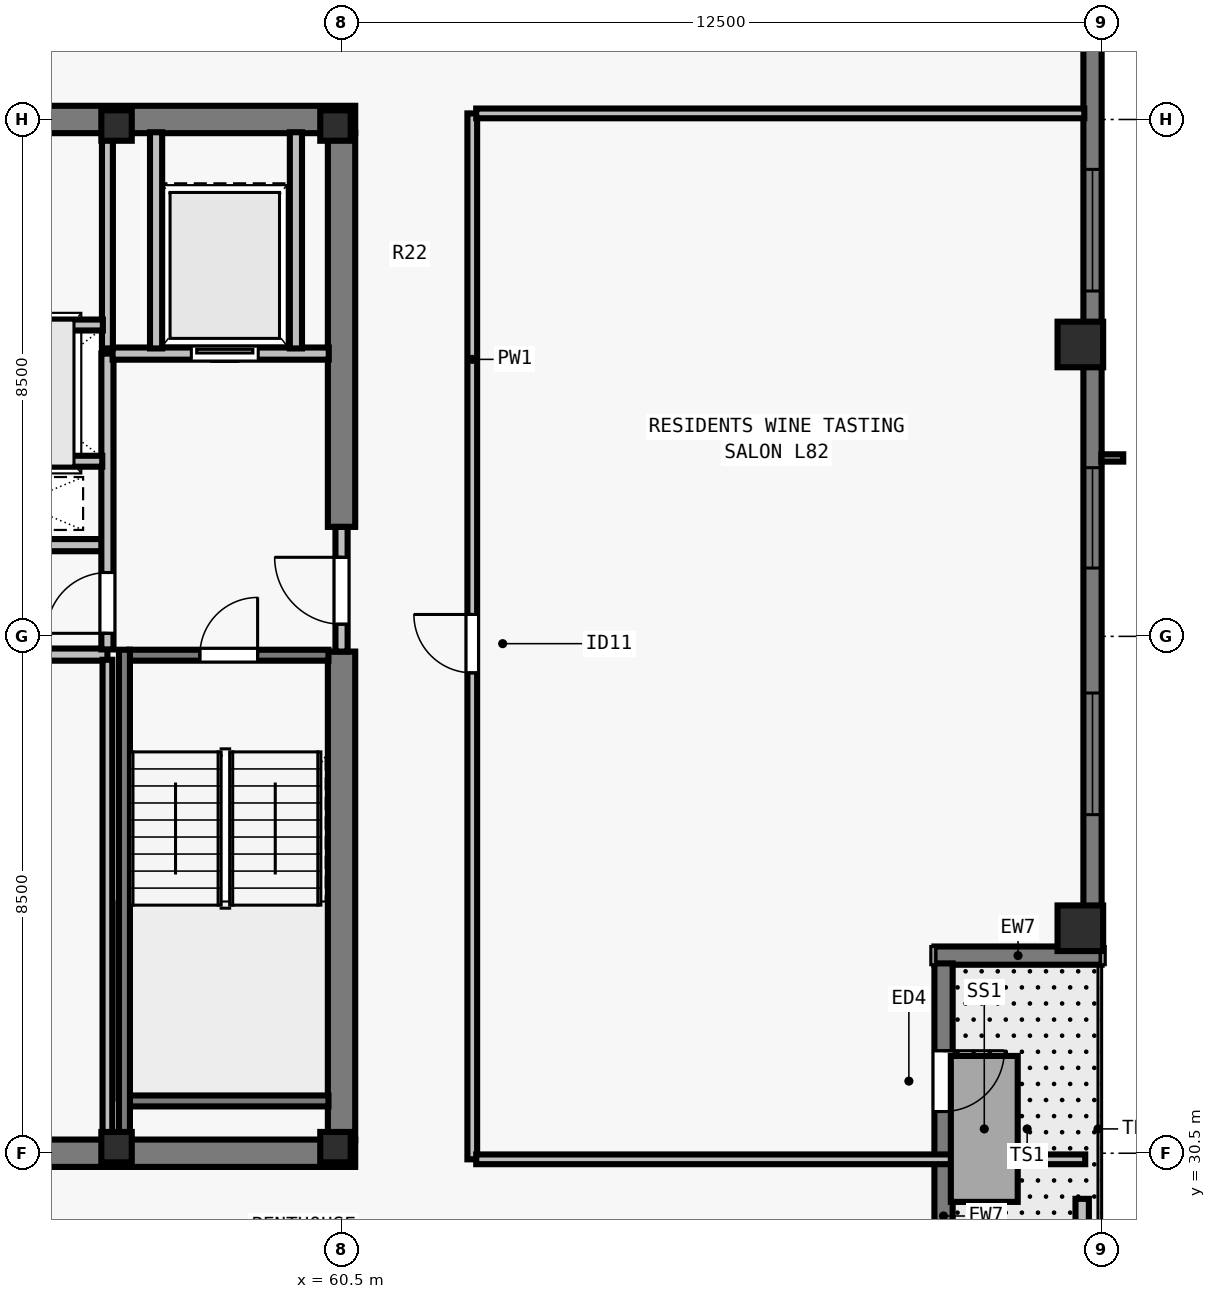
"""IFC4 building model, lengths in metres.
Left out: names, types, materials, properties, quantities, classifications, styles, units other than length and angle.
Written with IfcOpenShell. Run it as: python <this file> out.ifc"""

import sys

from ifc_helpers import new_model, si_unit, direction, frame, frame_2d, origin, origin_2d, place, context, subcontext, project, spatial, rectangle, i_section, extrude, element, fill, save


model = new_model("IFC4")
c1 = context("Model", 3, precision=1e-05, world=origin(), true_north=direction((0.0, 1.0)))
c2 = subcontext(c1, "Body", "Model", "MODEL_VIEW")
j1 = project(units=[si_unit("LENGTHUNIT", "METRE"), si_unit("PLANEANGLEUNIT", "RADIAN")], contexts=[c1])
p1 = place(None, origin())
s1 = spatial("IfcSite", under=j1, at=p1, CompositionType="ELEMENT")
p2 = place(p1, origin())
s2 = spatial("IfcBuilding", under=s1, at=p2, CompositionType="ELEMENT")
p3 = place(p2, frame((0.0, 0.0, 298.0)))
s3 = spatial("IfcBuildingStorey", under=s2, at=p3, CompositionType="ELEMENT", Elevation=298.0)
for number, where, z_axis, x_axis in (
    (1, (56.8, 30.6, 0.0), (0.0, 0.0, 1.0), (1.0, 0.0, 0.0)),
    (2, (60.4, 30.6, 0.0), (0.0, 0.0, 1.0), (1.0, 0.0, 0.0)),
    (3, (56.8, 47.4, 0.0), (0.0, 0.0, 1.0), (1.0, 0.0, 0.0)),
    (4, (60.4, 47.4, 0.0), (0.0, 0.0, 1.0), (1.0, 0.0, 0.0)),
):
    element("IfcColumn", number, at=place(p3, frame(where, z_axis=z_axis, x_axis=x_axis)), inside=s3, PredefinedType="COLUMN", context=c2, shape_type="SweptSolid", body=[
        extrude(i_section(OverallWidth=0.5, OverallDepth=0.5, WebThickness=0.028, FlangeThickness=0.045, at=origin_2d()), origin(), (0.0, 0.0, 1.0), 3.5),
    ])
for number, where, z_axis, x_axis in (
    (5, (72.65, 34.2, 0.0), (0.0, 0.0, 1.0), (0.0, 1.0, 0.0)),
    (6, (72.65, 43.8, 0.0), (0.0, 0.0, 1.0), (0.0, 1.0, 0.0)),
):
    element("IfcColumn", number, at=place(p3, frame(where, z_axis=z_axis, x_axis=x_axis)), inside=s3, PredefinedType="COLUMN", context=c2, shape_type="SweptSolid", body=[
        extrude(rectangle(XDim=0.75, YDim=0.75, at=origin_2d()), origin(), (0.0, 0.0, 1.0), 3.5),
    ])
p4 = place(p3, frame((72.85, 54.5, 0.0), z_axis=(0.0, 0.0, 1.0), x_axis=(0.0, -1.0, 0.0)))
e7 = element("IfcWall", 7, at=p4, inside=s3, PredefinedType="SOLIDWALL", context=c2, shape_type="SweptSolid", body=[
    extrude(rectangle(XDim=20.622, YDim=0.3, at=frame_2d((10.311, 0.0))), origin(), (0.0, 0.0, 1.0), 3.29),
])
p5 = place(p4, frame((7.821, 0.0, 0.8)))
e8 = element("IfcOpeningElement", 8, at=p5, cuts=e7, PredefinedType="OPENING", context=c2, shape_type="SweptSolid", body=[
    extrude(rectangle(XDim=2.0, YDim=1.758, at=frame_2d((1.0, 0.879))), frame((0.0, 0.16, 0.0), z_axis=(0.0, -1.0, 0.0), x_axis=(1.0, 0.0, 0.0)), (0.0, 0.0, 1.0), 0.32),
])
p6 = place(p4, frame((12.726, 0.0, 0.8)))
e9 = element("IfcOpeningElement", 9, at=p6, cuts=e7, PredefinedType="OPENING", context=c2, shape_type="SweptSolid", body=[
    extrude(rectangle(XDim=1.65, YDim=1.758, at=frame_2d((0.825, 0.879))), frame((0.0, 0.16, 0.0), z_axis=(0.0, -1.0, 0.0), x_axis=(1.0, 0.0, 0.0)), (0.0, 0.0, 1.0), 0.32),
])
p7 = place(p4, frame((16.432, 0.0, 0.8)))
e10 = element("IfcOpeningElement", 10, at=p7, cuts=e7, PredefinedType="OPENING", context=c2, shape_type="SweptSolid", body=[
    extrude(rectangle(XDim=2.0, YDim=1.758, at=frame_2d((1.0, 0.879))), frame((0.0, 0.16, 0.0), z_axis=(0.0, -1.0, 0.0), x_axis=(1.0, 0.0, 0.0)), (0.0, 0.0, 1.0), 0.32),
])
p8 = place(p3, frame((73.0, 33.75, 0.0), z_axis=(0.0, 0.0, 1.0), x_axis=(-1.0, 0.0, 0.0)))
e11 = element("IfcWall", 11, at=p8, inside=s3, PredefinedType="SOLIDWALL", context=c2, shape_type="SweptSolid", body=[
    extrude(rectangle(XDim=2.75, YDim=0.3, at=frame_2d((1.375, 0.0))), origin(), (0.0, 0.0, 1.0), 3.29),
])
p9 = place(p3, frame((70.4, 33.622, 0.0), z_axis=(0.0, 0.0, 1.0), x_axis=(0.0, -1.0, 0.0)))
e12 = element("IfcWall", 12, at=p9, inside=s3, PredefinedType="SOLIDWALL", context=c2, shape_type="SweptSolid", body=[
    extrude(rectangle(XDim=5.722, YDim=0.3, at=frame_2d((2.861, 0.0))), origin(), (0.0, 0.0, 1.0), 3.29),
])
p10 = place(p9, frame((1.436, 0.0, 0.0)))
e13 = element("IfcOpeningElement", 13, at=p10, cuts=e12, PredefinedType="OPENING", context=c2, shape_type="SweptSolid", body=[
    extrude(rectangle(XDim=1.0, YDim=2.15, at=frame_2d((0.5, 1.075))), frame((0.0, 0.16, 0.0), z_axis=(0.0, -1.0, 0.0), x_axis=(1.0, 0.0, 0.0)), (0.0, 0.0, 1.0), 0.32),
])
p11 = place(p3, frame((72.68, 28.45, 0.0), z_axis=(0.0, 0.0, 1.0), x_axis=(0.0, 1.0, 0.0)))
e14 = element("IfcWall", 14, at=p11, inside=s3, PredefinedType="PARAPET", context=c2, shape_type="SweptSolid", body=[
    extrude(rectangle(XDim=1.3, YDim=0.22, at=frame_2d((0.65, 0.0))), origin(), (0.0, 0.0, 1.0), 0.55),
])
for number, where, z_axis, x_axis in (
    (15, (43.275, 30.5, 0.0), (0.0, 0.0, 1.0), (1.0, 0.0, 0.0)),
    (16, (43.275, 47.5, 0.0), (0.0, 0.0, 1.0), (1.0, 0.0, 0.0)),
):
    element("IfcWall", number, at=place(p3, frame(where, z_axis=z_axis, x_axis=x_axis)), inside=s3, PredefinedType="SHEAR", context=c2, shape_type="SweptSolid", body=[
        extrude(rectangle(XDim=17.45, YDim=0.45, at=frame_2d((8.725, 0.0))), origin(), (0.0, 0.0, 1.0), 3.29),
    ])
p12 = place(p3, frame((60.5, 30.715, 0.0), z_axis=(0.0, 0.0, 1.0), x_axis=(0.0, 1.0, 0.0)))
e17 = element("IfcWall", 17, at=p12, inside=s3, PredefinedType="SHEAR", context=c2, shape_type="SweptSolid", body=[
    extrude(rectangle(XDim=8.035, YDim=0.45, at=frame_2d((4.018, 0.0))), origin(), (0.0, 0.0, 1.0), 3.29),
])
p13 = place(p3, frame((60.5, 40.8, 0.0), z_axis=(0.0, 0.0, 1.0), x_axis=(0.0, 1.0, 0.0)))
e18 = element("IfcWall", 18, at=p13, inside=s3, PredefinedType="SHEAR", context=c2, shape_type="SweptSolid", body=[
    extrude(rectangle(XDim=6.485, YDim=0.45, at=frame_2d((3.242, 0.0))), origin(), (0.0, 0.0, 1.0), 3.29),
])
for number, where, z_axis, x_axis in (
    (19, (53.7, 38.7, 0.0), (0.0, 0.0, 1.0), (1.0, 0.0, 0.0)),
    (20, (53.7, 40.5, 0.0), (0.0, 0.0, 1.0), (1.0, 0.0, 0.0)),
):
    element("IfcWall", number, at=place(p3, frame(where, z_axis=z_axis, x_axis=x_axis)), inside=s3, PredefinedType="SOLIDWALL", context=c2, shape_type="SweptSolid", body=[
        extrude(rectangle(XDim=2.95, YDim=0.2, at=frame_2d((1.475, 0.0))), origin(), (0.0, 0.0, 1.0), 3.29),
    ])
p14 = place(p3, frame((60.5, 38.75, 0.0), z_axis=(0.0, 0.0, 1.0), x_axis=(0.0, 1.0, 0.0)))
e21 = element("IfcWall", 21, at=p14, inside=s3, PredefinedType="SOLIDWALL", context=c2, shape_type="SweptSolid", body=[
    extrude(rectangle(XDim=2.05, YDim=0.2, at=frame_2d((1.025, 0.0))), origin(), (0.0, 0.0, 1.0), 3.29),
])
p15 = place(p14, frame((0.45, 0.0, 0.0)))
e22 = element("IfcOpeningElement", 22, at=p15, cuts=e21, PredefinedType="OPENING", context=c2, shape_type="SweptSolid", body=[
    extrude(rectangle(XDim=1.1, YDim=2.15, at=frame_2d((0.55, 1.075))), frame((0.0, 0.11, 0.0), z_axis=(0.0, -1.0, 0.0), x_axis=(1.0, 0.0, 0.0)), (0.0, 0.0, 1.0), 0.22),
])
p16 = place(p3, frame((56.65, 38.785, 0.0), z_axis=(0.0, 0.0, 1.0), x_axis=(0.0, 1.0, 0.0)))
e23 = element("IfcWall", 23, at=p16, inside=s3, PredefinedType="SOLIDWALL", context=c2, shape_type="SweptSolid", body=[
    extrude(rectangle(XDim=4.865, YDim=0.2, at=frame_2d((2.433, 0.0))), origin(), (0.0, 0.0, 1.0), 3.29),
])
p17 = place(p16, frame((0.265, 0.0, 0.0)))
e24 = element("IfcOpeningElement", 24, at=p17, cuts=e23, PredefinedType="OPENING", context=c2, shape_type="SweptSolid", body=[
    extrude(rectangle(XDim=1.0, YDim=2.15, at=frame_2d((0.5, 1.075))), frame((0.0, 0.11, 0.0), z_axis=(0.0, -1.0, 0.0), x_axis=(1.0, 0.0, 0.0)), (0.0, 0.0, 1.0), 0.22),
])
p18 = place(p3, frame((56.735, 43.65, 0.0), z_axis=(0.0, 0.0, 1.0), x_axis=(1.0, 0.0, 0.0)))
e25 = element("IfcWall", 25, at=p18, inside=s3, PredefinedType="SOLIDWALL", context=c2, shape_type="SweptSolid", body=[
    extrude(rectangle(XDim=3.555, YDim=0.2, at=frame_2d((1.777, 0.0))), origin(), (0.0, 0.0, 1.0), 3.29),
])
p19 = place(p18, frame((1.295, 0.0, 0.0)))
e26 = element("IfcOpeningElement", 26, at=p19, cuts=e25, PredefinedType="OPENING", context=c2, shape_type="SweptSolid", body=[
    extrude(rectangle(XDim=1.1, YDim=2.2, at=frame_2d((0.55, 1.1))), frame((0.0, 0.11, 0.0), z_axis=(0.0, -1.0, 0.0), x_axis=(1.0, 0.0, 0.0)), (0.0, 0.0, 1.0), 0.22),
])
for number, where, z_axis, x_axis in (
    (27, (57.45, 43.735, 0.0), (0.0, 0.0, 1.0), (0.0, 1.0, 0.0)),
    (28, (59.75, 43.735, 0.0), (0.0, 0.0, 1.0), (0.0, 1.0, 0.0)),
):
    element("IfcWall", number, at=place(p3, frame(where, z_axis=z_axis, x_axis=x_axis)), inside=s3, PredefinedType="SOLIDWALL", context=c2, shape_type="SweptSolid", body=[
        extrude(rectangle(XDim=3.555, YDim=0.2, at=frame_2d((1.777, 0.0))), origin(), (0.0, 0.0, 1.0), 3.29),
    ])
p20 = place(p3, frame((56.65, 30.71, 0.0), z_axis=(0.0, 0.0, 1.0), x_axis=(0.0, 1.0, 0.0)))
e29 = element("IfcWall", 29, at=p20, inside=s3, PredefinedType="PARTITIONING", context=c2, shape_type="SweptSolid", body=[
    extrude(rectangle(XDim=7.905, YDim=0.16, at=frame_2d((3.953, 0.0))), origin(), (0.0, 0.0, 1.0), 3.29),
])
p21 = place(p3, frame((56.65, 43.735, 0.0), z_axis=(0.0, 0.0, 1.0), x_axis=(0.0, 1.0, 0.0)))
e30 = element("IfcWall", 30, at=p21, inside=s3, PredefinedType="SOLIDWALL", context=c2, shape_type="SweptSolid", body=[
    extrude(rectangle(XDim=3.555, YDim=0.18, at=frame_2d((1.777, 0.0))), origin(), (0.0, 0.0, 1.0), 3.29),
])
p22 = place(p3, frame((53.785, 41.88, 0.0), z_axis=(0.0, 0.0, 1.0), x_axis=(1.0, 0.0, 0.0)))
e31 = element("IfcWall", 31, at=p22, inside=s3, PredefinedType="SOLIDWALL", context=c2, shape_type="SweptSolid", body=[
    extrude(rectangle(XDim=2.78, YDim=0.18, at=frame_2d((1.39, 0.0))), origin(), (0.0, 0.0, 1.0), 3.29),
])
p23 = place(p3, frame((53.785, 44.12, 0.0), z_axis=(0.0, 0.0, 1.0), x_axis=(1.0, 0.0, 0.0)))
e32 = element("IfcWall", 32, at=p23, inside=s3, PredefinedType="SOLIDWALL", context=c2, shape_type="SweptSolid", body=[
    extrude(rectangle(XDim=2.79, YDim=0.18, at=frame_2d((1.395, 0.0))), origin(), (0.0, 0.0, 1.0), 3.29),
])
p24 = place(p3, frame((62.65, 30.4, 0.0), z_axis=(0.0, 0.0, 1.0), x_axis=(0.0, 1.0, 0.0)))
e33 = element("IfcWall", 33, at=p24, inside=s3, PredefinedType="PARTITIONING", context=c2, shape_type="SweptSolid", body=[
    extrude(rectangle(XDim=17.2, YDim=0.16, at=frame_2d((8.6, 0.0))), origin(), (0.0, 0.0, 1.0), 3.29),
])
p25 = place(p24, frame((8.0, 0.0, 0.0)))
e34 = element("IfcOpeningElement", 34, at=p25, cuts=e33, PredefinedType="OPENING", context=c2, shape_type="SweptSolid", body=[
    extrude(rectangle(XDim=0.96, YDim=2.12, at=frame_2d((0.48, 1.06))), frame((0.0, 0.09, 0.0), z_axis=(0.0, -1.0, 0.0), x_axis=(1.0, 0.0, 0.0)), (0.0, 0.0, 1.0), 0.18),
])
p26 = place(p3, frame((62.715, 30.4, 0.0), z_axis=(0.0, 0.0, 1.0), x_axis=(1.0, 0.0, 0.0)))
e35 = element("IfcWall", 35, at=p26, inside=s3, PredefinedType="PARTITIONING", context=c2, shape_type="SweptSolid", body=[
    extrude(rectangle(XDim=10.015, YDim=0.16, at=frame_2d((5.007, 0.0))), origin(), (0.0, 0.0, 1.0), 3.29),
])
p27 = place(p3, frame((62.715, 47.6, 0.0), z_axis=(0.0, 0.0, 1.0), x_axis=(1.0, 0.0, 0.0)))
e36 = element("IfcWall", 36, at=p27, inside=s3, PredefinedType="PARTITIONING", context=c2, shape_type="SweptSolid", body=[
    extrude(rectangle(XDim=10.0, YDim=0.16, at=frame_2d((5.0, 0.0))), origin(), (0.0, 0.0, 1.0), 3.29),
])
p28 = place(p3, frame((57.005, 38.69, 0.0), z_axis=(0.0, 0.0, 1.0), x_axis=(1.0, 0.0, 0.0)))
e37 = element("IfcWall", 37, at=p28, inside=s3, PredefinedType="SOLIDWALL", context=c2, shape_type="SweptSolid", body=[
    extrude(rectangle(XDim=3.28, YDim=0.18, at=frame_2d((1.64, 0.0))), origin(), (0.0, 0.0, 1.0), 3.29),
])
p29 = place(p28, frame((1.165, 0.0, 0.0)))
e38 = element("IfcOpeningElement", 38, at=p29, cuts=e37, PredefinedType="OPENING", context=c2, shape_type="SweptSolid", body=[
    extrude(rectangle(XDim=0.95, YDim=2.15, at=frame_2d((0.475, 1.075))), frame((0.0, 0.1, 0.0), z_axis=(0.0, -1.0, 0.0), x_axis=(1.0, 0.0, 0.0)), (0.0, 0.0, 1.0), 0.2),
])
p30 = place(p3, frame((57.005, 31.36, 0.0), z_axis=(0.0, 0.0, 1.0), x_axis=(1.0, 0.0, 0.0)))
e39 = element("IfcWall", 39, at=p30, inside=s3, PredefinedType="SOLIDWALL", context=c2, shape_type="SweptSolid", body=[
    extrude(rectangle(XDim=3.28, YDim=0.18, at=frame_2d((1.64, 0.0))), origin(), (0.0, 0.0, 1.0), 3.29),
])
p31 = place(p3, frame((56.93, 38.78, 0.0), z_axis=(0.0, 0.0, 1.0), x_axis=(0.0, -1.0, 0.0)))
e40 = element("IfcWall", 40, at=p31, inside=s3, PredefinedType="SOLIDWALL", context=c2, shape_type="SweptSolid", body=[
    extrude(rectangle(XDim=8.067, YDim=0.18, at=frame_2d((4.034, 0.0))), origin(), (0.0, 0.0, 1.0), 3.29),
])
p32 = place(p5, origin())
e41 = element("IfcWindow", 41, at=p32, inside=s3, PartitioningType="SINGLE_PANEL", PredefinedType="WINDOW", context=c2, shape_type="SweptSolid", body=[
    extrude(rectangle(XDim=2.0, YDim=1.758, at=frame_2d((1.0, 0.879))), frame((0.0, -0.05, 0.0), z_axis=(0.0, -1.0, 0.0), x_axis=(1.0, 0.0, 0.0)), (0.0, 0.0, 1.0), 0.06),
])
fill(e8, e41)
p33 = place(p6, origin())
e42 = element("IfcWindow", 42, at=p33, inside=s3, PartitioningType="SINGLE_PANEL", PredefinedType="WINDOW", context=c2, shape_type="SweptSolid", body=[
    extrude(rectangle(XDim=1.65, YDim=1.758, at=frame_2d((0.825, 0.879))), frame((0.0, -0.05, 0.0), z_axis=(0.0, -1.0, 0.0), x_axis=(1.0, 0.0, 0.0)), (0.0, 0.0, 1.0), 0.06),
])
fill(e9, e42)
p34 = place(p7, origin())
e43 = element("IfcWindow", 43, at=p34, inside=s3, PartitioningType="SINGLE_PANEL", PredefinedType="WINDOW", context=c2, shape_type="SweptSolid", body=[
    extrude(rectangle(XDim=2.0, YDim=1.758, at=frame_2d((1.0, 0.879))), frame((0.0, -0.05, 0.0), z_axis=(0.0, -1.0, 0.0), x_axis=(1.0, 0.0, 0.0)), (0.0, 0.0, 1.0), 0.06),
])
fill(e10, e43)
p35 = place(p10, origin())
e44 = element("IfcDoor", 44, at=p35, inside=s3, OperationType="SINGLE_SWING_LEFT", PredefinedType="DOOR", context=c2, shape_type="SweptSolid", body=[
    extrude(rectangle(XDim=1.0, YDim=2.15, at=frame_2d((0.5, 1.075))), frame((0.0, 0.025, 0.0), z_axis=(0.0, -1.0, 0.0), x_axis=(1.0, 0.0, 0.0)), (0.0, 0.0, 1.0), 0.05),
])
fill(e13, e44)
p36 = place(p15, origin())
e45 = element("IfcDoor", 45, at=p36, inside=s3, OperationType="SINGLE_SWING_RIGHT", PredefinedType="DOOR", context=c2, shape_type="SweptSolid", body=[
    extrude(rectangle(XDim=1.1, YDim=2.15, at=frame_2d((0.55, 1.075))), frame((0.0, 0.025, 0.0), z_axis=(0.0, -1.0, 0.0), x_axis=(1.0, 0.0, 0.0)), (0.0, 0.0, 1.0), 0.05),
])
fill(e22, e45)
p37 = place(p17, origin())
e46 = element("IfcDoor", 46, at=p37, inside=s3, OperationType="SINGLE_SWING_LEFT", PredefinedType="DOOR", context=c2, shape_type="SweptSolid", body=[
    extrude(rectangle(XDim=1.0, YDim=2.15, at=frame_2d((0.5, 1.075))), frame((0.0, 0.025, 0.0), z_axis=(0.0, -1.0, 0.0), x_axis=(1.0, 0.0, 0.0)), (0.0, 0.0, 1.0), 0.05),
])
fill(e24, e46)
p38 = place(p19, origin())
e47 = element("IfcDoor", 47, at=p38, inside=s3, OperationType="SLIDING_TO_LEFT", PredefinedType="DOOR", context=c2, shape_type="SweptSolid", body=[
    extrude(rectangle(XDim=1.1, YDim=2.2, at=frame_2d((0.55, 1.1))), frame((0.0, 0.025, 0.0), z_axis=(0.0, -1.0, 0.0), x_axis=(1.0, 0.0, 0.0)), (0.0, 0.0, 1.0), 0.05),
])
fill(e26, e47)
p39 = place(p25, origin())
e48 = element("IfcDoor", 48, at=p39, inside=s3, OperationType="SINGLE_SWING_RIGHT", PredefinedType="DOOR", context=c2, shape_type="SweptSolid", body=[
    extrude(rectangle(XDim=0.96, YDim=2.12, at=frame_2d((0.48, 1.06))), frame((0.0, 0.025, 0.0), z_axis=(0.0, -1.0, 0.0), x_axis=(1.0, 0.0, 0.0)), (0.0, 0.0, 1.0), 0.05),
])
fill(e34, e48)
p40 = place(p29, origin())
e49 = element("IfcDoor", 49, at=p40, inside=s3, OperationType="SINGLE_SWING_RIGHT", PredefinedType="DOOR", context=c2, shape_type="SweptSolid", body=[
    extrude(rectangle(XDim=0.95, YDim=2.15, at=frame_2d((0.475, 1.075))), frame((0.0, 0.025, 0.0), z_axis=(0.0, -1.0, 0.0), x_axis=(1.0, 0.0, 0.0)), (0.0, 0.0, 1.0), 0.05),
])
fill(e38, e49)
save(model, sys.argv[1])
